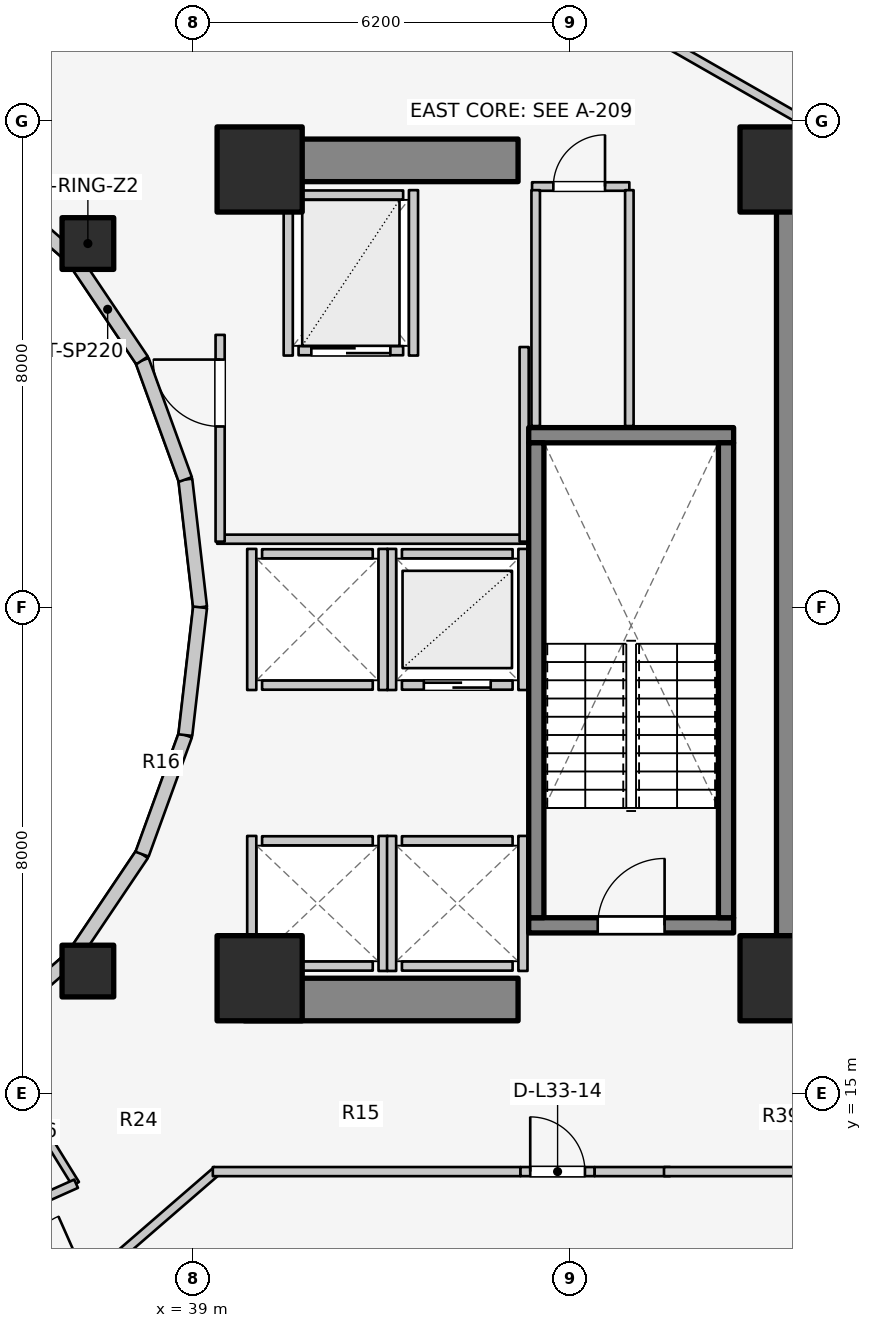
"""IFC4 building model, lengths in metres.
Left out: names, types, materials, properties, quantities, classifications, styles, units other than length and angle.
Written with IfcOpenShell. Run it as: python <this file> out.ifc"""

import sys

from ifc_helpers import new_model, si_unit, direction, frame, frame_2d, origin, origin_2d, place, context, subcontext, project, spatial, rectangle, extrude, element, fill, save


model = new_model("IFC4")
c1 = context("Model", 3, precision=1e-05, world=origin(), true_north=direction((0.0, 1.0)))
c2 = subcontext(c1, "Body", "Model", "MODEL_VIEW")
j1 = project(units=[si_unit("LENGTHUNIT", "METRE"), si_unit("PLANEANGLEUNIT", "RADIAN")], contexts=[c1])
p1 = place(None, origin())
s1 = spatial("IfcSite", under=j1, at=p1, CompositionType="ELEMENT")
p2 = place(p1, origin())
s2 = spatial("IfcBuilding", under=s1, at=p2, CompositionType="ELEMENT")
p3 = place(p2, frame((0.0, 0.0, 110.4)))
s3 = spatial("IfcBuildingStorey", under=s2, at=p3, CompositionType="ELEMENT", Elevation=110.4)
p4 = place(p3, frame((48.95, 17.05, 0.0), z_axis=(0.0, 0.0, 1.0), x_axis=(0.0, 1.0, 0.0)))
e1 = element("IfcWall", 1, at=p4, inside=s3, PredefinedType="SHEAR", context=c2, shape_type="SweptSolid", body=[
    extrude(rectangle(XDim=12.8, YDim=0.7, at=frame_2d((6.4, 0.0))), origin(), (0.0, 0.0, 1.0), 3.1),
])
for number, where, z_axis, x_axis in (
    (2, (39.85, 16.55, 0.0), (0.0, 0.0, 1.0), (1.0, 0.0, 0.0)),
    (3, (39.85, 30.35, 0.0), (0.0, 0.0, 1.0), (1.0, 0.0, 0.0)),
):
    element("IfcWall", number, at=place(p3, frame(where, z_axis=z_axis, x_axis=x_axis)), inside=s3, PredefinedType="SHEAR", context=c2, shape_type="SweptSolid", body=[
        extrude(rectangle(XDim=4.5, YDim=0.7, at=frame_2d((2.25, 0.0))), origin(), (0.0, 0.0, 1.0), 3.1),
    ])
p5 = place(p3, frame((44.525, 17.77, 0.0), z_axis=(0.0, 0.0, 1.0), x_axis=(1.0, 0.0, 0.0)))
e4 = element("IfcWall", 4, at=p5, inside=s3, PredefinedType="SOLIDWALL", context=c2, shape_type="SweptSolid", body=[
    extrude(rectangle(XDim=3.37, YDim=0.25, at=frame_2d((1.685, 0.0))), origin(), (0.0, 0.0, 1.0), 3.1),
])
p6 = place(p5, frame((1.135, 0.0, 0.0)))
e5 = element("IfcOpeningElement", 5, at=p6, cuts=e4, PredefinedType="OPENING", context=c2, shape_type="SweptSolid", body=[
    extrude(rectangle(XDim=1.1, YDim=2.1, at=frame_2d((0.55, 1.05))), frame((0.0, 0.135, 0.0), z_axis=(0.0, -1.0, 0.0), x_axis=(1.0, 0.0, 0.0)), (0.0, 0.0, 1.0), 0.27),
])
p7 = place(p3, frame((44.525, 25.83, 0.0), z_axis=(0.0, 0.0, 1.0), x_axis=(1.0, 0.0, 0.0)))
e6 = element("IfcWall", 6, at=p7, inside=s3, PredefinedType="SOLIDWALL", context=c2, shape_type="SweptSolid", body=[
    extrude(rectangle(XDim=3.37, YDim=0.25, at=frame_2d((1.685, 0.0))), origin(), (0.0, 0.0, 1.0), 3.1),
])
for number, where, z_axis, x_axis in (
    (7, (44.65, 17.895, 0.0), (0.0, 0.0, 1.0), (0.0, 1.0, 0.0)),
    (8, (47.77, 17.895, 0.0), (0.0, 0.0, 1.0), (0.0, 1.0, 0.0)),
):
    element("IfcWall", number, at=place(p3, frame(where, z_axis=z_axis, x_axis=x_axis)), inside=s3, PredefinedType="SOLIDWALL", context=c2, shape_type="SweptSolid", body=[
        extrude(rectangle(XDim=7.81, YDim=0.25, at=frame_2d((3.905, 0.0))), origin(), (0.0, 0.0, 1.0), 3.1),
    ])
for number, where, z_axis, x_axis in (
    (9, (40.1, 16.9, 0.0), (0.0, 0.0, 1.0), (1.0, 0.0, 0.0)),
    (10, (48.7, 16.9, 0.0), (0.0, 0.0, 1.0), (1.0, 0.0, 0.0)),
    (11, (48.7, 30.2, 0.0), (0.0, 0.0, 1.0), (1.0, 0.0, 0.0)),
    (12, (40.1, 30.2, 0.0), (0.0, 0.0, 1.0), (1.0, 0.0, 0.0)),
):
    element("IfcColumn", number, at=place(p3, frame(where, z_axis=z_axis, x_axis=x_axis)), inside=s3, PredefinedType="COLUMN", context=c2, shape_type="SweptSolid", body=[
        extrude(rectangle(XDim=1.4, YDim=1.4, at=origin_2d()), origin(), (0.0, 0.0, 1.0), 3.1),
    ])
for number, where, z_axis, x_axis in (
    (13, (37.275, 28.982, 0.0), (0.0, 0.0, 1.0), (1.0, 0.0, 0.0)),
    (14, (37.275, 17.018, 0.0), (0.0, 0.0, 1.0), (1.0, 0.0, 0.0)),
):
    element("IfcColumn", number, at=place(p3, frame(where, z_axis=z_axis, x_axis=x_axis)), inside=s3, PredefinedType="COLUMN", context=c2, shape_type="SweptSolid", body=[
        extrude(rectangle(XDim=0.85, YDim=0.85, at=origin_2d()), origin(), (0.0, 0.0, 1.0), 3.1),
    ])
p8 = place(p3, frame((39.12, 23.0, 0.0), z_axis=(0.0, 0.0, 1.0), x_axis=(-0.114711713601, 0.993398823617, 0.0)))
e15 = element("IfcWall", 15, at=p8, inside=s3, PredefinedType="STANDARD", context=c2, shape_type="SweptSolid", body=[
    extrude(rectangle(XDim=2.115, YDim=0.23, at=frame_2d((1.058, 0.0))), origin(), (0.0, 0.0, 1.0), 2.56),
])
p9 = place(p3, frame((38.877, 25.102, 0.0), z_axis=(0.0, 0.0, 1.0), x_axis=(-0.341423187295, 0.93990968033, 0.0)))
e16 = element("IfcWall", 16, at=p9, inside=s3, PredefinedType="STANDARD", context=c2, shape_type="SweptSolid", body=[
    extrude(rectangle(XDim=2.084, YDim=0.23, at=frame_2d((1.042, 0.0))), origin(), (0.0, 0.0, 1.0), 2.56),
])
p10 = place(p3, frame((38.166, 27.06, 0.0), z_axis=(0.0, 0.0, 1.0), x_axis=(-0.558197800898, 0.829707909492, 0.0)))
e17 = element("IfcWall", 17, at=p10, inside=s3, PredefinedType="STANDARD", context=c2, shape_type="SweptSolid", body=[
    extrude(rectangle(XDim=2.027, YDim=0.23, at=frame_2d((1.013, 0.0))), origin(), (0.0, 0.0, 1.0), 1.22),
])
for number, where, z_axis, x_axis in (
    (18, (37.035, 28.742, 0.0), (0.0, 0.0, 1.0), (-0.753, 0.659, 0.0)),
    (19, (35.56, 15.968, 0.0), (0.0, 0.0, 1.0), (0.753, 0.659, 0.0)),
):
    element("IfcWall", number, at=place(p3, frame(where, z_axis=z_axis, x_axis=x_axis)), inside=s3, PredefinedType="STANDARD", context=c2, shape_type="SweptSolid", body=[
        extrude(rectangle(XDim=1.959, YDim=0.23, at=frame_2d((0.98, 0.0))), origin(), (0.0, 0.0, 1.0), 1.22),
    ])
p11 = place(p3, frame((37.035, 17.258, 0.0), z_axis=(0.0, 0.0, 1.0), x_axis=(0.558197800898, 0.829707909492, 0.0)))
e20 = element("IfcWall", 20, at=p11, inside=s3, PredefinedType="STANDARD", context=c2, shape_type="SweptSolid", body=[
    extrude(rectangle(XDim=2.027, YDim=0.23, at=frame_2d((1.013, 0.0))), origin(), (0.0, 0.0, 1.0), 1.22),
])
p12 = place(p3, frame((38.166, 18.94, 0.0), z_axis=(0.0, 0.0, 1.0), x_axis=(0.341423187295, 0.93990968033, 0.0)))
e21 = element("IfcWall", 21, at=p12, inside=s3, PredefinedType="STANDARD", context=c2, shape_type="SweptSolid", body=[
    extrude(rectangle(XDim=2.084, YDim=0.23, at=frame_2d((1.042, 0.0))), origin(), (0.0, 0.0, 1.0), 2.56),
])
p13 = place(p3, frame((38.877, 20.898, 0.0), z_axis=(0.0, 0.0, 1.0), x_axis=(0.114711713601, 0.993398823617, 0.0)))
e22 = element("IfcWall", 22, at=p13, inside=s3, PredefinedType="STANDARD", context=c2, shape_type="SweptSolid", body=[
    extrude(rectangle(XDim=2.115, YDim=0.23, at=frame_2d((1.058, 0.0))), origin(), (0.0, 0.0, 1.0), 2.56),
])
for number, where, z_axis, x_axis in (
    (23, (40.14, 19.16, 0.0), (0.0, 0.0, 1.0), (1.0, 0.0, 0.0)),
    (24, (40.14, 17.1, 0.0), (0.0, 0.0, 1.0), (1.0, 0.0, 0.0)),
):
    element("IfcWall", number, at=place(p3, frame(where, z_axis=z_axis, x_axis=x_axis)), inside=s3, PredefinedType="SOLIDWALL", context=c2, shape_type="SweptSolid", body=[
        extrude(rectangle(XDim=1.82, YDim=0.15, at=frame_2d((0.91, 0.0))), origin(), (0.0, 0.0, 1.0), 2.12),
    ])
p14 = place(p3, frame((39.97, 17.02, 0.0), z_axis=(0.0, 0.0, 1.0), x_axis=(0.0, 1.0, 0.0)))
e25 = element("IfcWall", 25, at=p14, inside=s3, PredefinedType="SOLIDWALL", context=c2, shape_type="SweptSolid", body=[
    extrude(rectangle(XDim=2.22, YDim=0.15, at=frame_2d((1.11, 0.0))), origin(), (0.0, 0.0, 1.0), 1.873),
])
p15 = place(p3, frame((42.13, 17.02, 0.0), z_axis=(0.0, 0.0, 1.0), x_axis=(0.0, 1.0, 0.0)))
e26 = element("IfcWall", 26, at=p15, inside=s3, PredefinedType="SOLIDWALL", context=c2, shape_type="SweptSolid", body=[
    extrude(rectangle(XDim=2.22, YDim=0.15, at=frame_2d((1.11, 0.0))), origin(), (0.0, 0.0, 1.0), 2.575),
])
for number, where, z_axis, x_axis in (
    (27, (42.44, 19.16, 0.0), (0.0, 0.0, 1.0), (1.0, 0.0, 0.0)),
    (28, (42.44, 17.1, 0.0), (0.0, 0.0, 1.0), (1.0, 0.0, 0.0)),
):
    element("IfcWall", number, at=place(p3, frame(where, z_axis=z_axis, x_axis=x_axis)), inside=s3, PredefinedType="SOLIDWALL", context=c2, shape_type="SweptSolid", body=[
        extrude(rectangle(XDim=1.82, YDim=0.15, at=frame_2d((0.91, 0.0))), origin(), (0.0, 0.0, 1.0), 2.575),
    ])
p16 = place(p3, frame((42.27, 17.02, 0.0), z_axis=(0.0, 0.0, 1.0), x_axis=(0.0, 1.0, 0.0)))
e29 = element("IfcWall", 29, at=p16, inside=s3, PredefinedType="SOLIDWALL", context=c2, shape_type="SweptSolid", body=[
    extrude(rectangle(XDim=2.22, YDim=0.15, at=frame_2d((1.11, 0.0))), origin(), (0.0, 0.0, 1.0), 2.575),
])
p17 = place(p3, frame((44.43, 17.02, 0.0), z_axis=(0.0, 0.0, 1.0), x_axis=(0.0, 1.0, 0.0)))
e30 = element("IfcWall", 30, at=p17, inside=s3, PredefinedType="SOLIDWALL", context=c2, shape_type="SweptSolid", body=[
    extrude(rectangle(XDim=2.22, YDim=0.15, at=frame_2d((1.11, 0.0))), origin(), (0.0, 0.0, 1.0), 2.12),
])
p18 = place(p3, frame((42.44, 21.72, 0.0), z_axis=(0.0, 0.0, 1.0), x_axis=(1.0, 0.0, 0.0)))
e31 = element("IfcWall", 31, at=p18, inside=s3, PredefinedType="SOLIDWALL", context=c2, shape_type="SweptSolid", body=[
    extrude(rectangle(XDim=1.82, YDim=0.15, at=frame_2d((0.91, 0.0))), origin(), (0.0, 0.0, 1.0), 2.575),
])
p19 = place(p18, frame((0.36, 0.0, 0.0)))
e32 = element("IfcOpeningElement", 32, at=p19, cuts=e31, PredefinedType="OPENING", context=c2, shape_type="SweptSolid", body=[
    extrude(rectangle(XDim=1.1, YDim=2.1, at=frame_2d((0.55, 1.05))), frame((0.0, 0.085, 0.0), z_axis=(0.0, -1.0, 0.0), x_axis=(1.0, 0.0, 0.0)), (0.0, 0.0, 1.0), 0.17),
])
p20 = place(p3, frame((42.44, 23.88, 0.0), z_axis=(0.0, 0.0, 1.0), x_axis=(1.0, 0.0, 0.0)))
e33 = element("IfcWall", 33, at=p20, inside=s3, PredefinedType="SOLIDWALL", context=c2, shape_type="SweptSolid", body=[
    extrude(rectangle(XDim=1.82, YDim=0.15, at=frame_2d((0.91, 0.0))), origin(), (0.0, 0.0, 1.0), 2.575),
])
for number, where, z_axis, x_axis in (
    (34, (42.27, 21.64, 0.0), (0.0, 0.0, 1.0), (0.0, 1.0, 0.0)),
    (35, (44.43, 21.64, 0.0), (0.0, 0.0, 1.0), (0.0, 1.0, 0.0)),
):
    element("IfcWall", number, at=place(p3, frame(where, z_axis=z_axis, x_axis=x_axis)), inside=s3, PredefinedType="SOLIDWALL", context=c2, shape_type="SweptSolid", body=[
        extrude(rectangle(XDim=2.32, YDim=0.15, at=frame_2d((1.16, 0.0))), origin(), (0.0, 0.0, 1.0), 2.575),
    ])
for number, where, z_axis, x_axis in (
    (36, (40.14, 21.72, 0.0), (0.0, 0.0, 1.0), (1.0, 0.0, 0.0)),
    (37, (40.14, 23.88, 0.0), (0.0, 0.0, 1.0), (1.0, 0.0, 0.0)),
):
    element("IfcWall", number, at=place(p3, frame(where, z_axis=z_axis, x_axis=x_axis)), inside=s3, PredefinedType="SOLIDWALL", context=c2, shape_type="SweptSolid", body=[
        extrude(rectangle(XDim=1.82, YDim=0.15, at=frame_2d((0.91, 0.0))), origin(), (0.0, 0.0, 1.0), 2.12),
    ])
p21 = place(p3, frame((39.97, 21.64, 0.0), z_axis=(0.0, 0.0, 1.0), x_axis=(0.0, 1.0, 0.0)))
e38 = element("IfcWall", 38, at=p21, inside=s3, PredefinedType="SOLIDWALL", context=c2, shape_type="SweptSolid", body=[
    extrude(rectangle(XDim=2.32, YDim=0.15, at=frame_2d((1.16, 0.0))), origin(), (0.0, 0.0, 1.0), 2.12),
])
p22 = place(p3, frame((42.13, 21.64, 0.0), z_axis=(0.0, 0.0, 1.0), x_axis=(0.0, 1.0, 0.0)))
e39 = element("IfcWall", 39, at=p22, inside=s3, PredefinedType="SOLIDWALL", context=c2, shape_type="SweptSolid", body=[
    extrude(rectangle(XDim=2.32, YDim=0.15, at=frame_2d((1.16, 0.0))), origin(), (0.0, 0.0, 1.0), 2.575),
])
p23 = place(p3, frame((40.74, 27.22, 0.0), z_axis=(0.0, 0.0, 1.0), x_axis=(1.0, 0.0, 0.0)))
e40 = element("IfcWall", 40, at=p23, inside=s3, PredefinedType="SOLIDWALL", context=c2, shape_type="SweptSolid", body=[
    extrude(rectangle(XDim=1.72, YDim=0.15, at=frame_2d((0.86, 0.0))), origin(), (0.0, 0.0, 1.0), 2.575),
])
p24 = place(p23, frame((0.21, 0.0, 0.0)))
e41 = element("IfcOpeningElement", 41, at=p24, cuts=e40, PredefinedType="OPENING", context=c2, shape_type="SweptSolid", body=[
    extrude(rectangle(XDim=1.3, YDim=2.1, at=frame_2d((0.65, 1.05))), frame((0.0, 0.085, 0.0), z_axis=(0.0, -1.0, 0.0), x_axis=(1.0, 0.0, 0.0)), (0.0, 0.0, 1.0), 0.17),
])
p25 = place(p3, frame((40.74, 29.78, 0.0), z_axis=(0.0, 0.0, 1.0), x_axis=(1.0, 0.0, 0.0)))
e42 = element("IfcWall", 42, at=p25, inside=s3, PredefinedType="SOLIDWALL", context=c2, shape_type="SweptSolid", body=[
    extrude(rectangle(XDim=1.72, YDim=0.15, at=frame_2d((0.86, 0.0))), origin(), (0.0, 0.0, 1.0), 2.575),
])
for number, where, z_axis, x_axis in (
    (43, (40.57, 27.14, 0.0), (0.0, 0.0, 1.0), (0.0, 1.0, 0.0)),
    (44, (42.63, 27.14, 0.0), (0.0, 0.0, 1.0), (0.0, 1.0, 0.0)),
):
    element("IfcWall", number, at=place(p3, frame(where, z_axis=z_axis, x_axis=x_axis)), inside=s3, PredefinedType="SOLIDWALL", context=c2, shape_type="SweptSolid", body=[
        extrude(rectangle(XDim=2.72, YDim=0.15, at=frame_2d((1.36, 0.0))), origin(), (0.0, 0.0, 1.0), 2.575),
    ])
p26 = place(p3, frame((39.4, 24.12, 0.0), z_axis=(0.0, 0.0, 1.0), x_axis=(1.0, 0.0, 0.0)))
e45 = element("IfcWall", 45, at=p26, inside=s3, PredefinedType="PARTITIONING", context=c2, shape_type="SweptSolid", body=[
    extrude(rectangle(XDim=5.08, YDim=0.15, at=frame_2d((2.54, 0.0))), origin(), (0.0, 0.0, 1.0), 2.12),
])
p27 = place(p3, frame((44.45, 24.08, 0.0), z_axis=(0.0, 0.0, 1.0), x_axis=(0.0, 1.0, 0.0)))
e46 = element("IfcWall", 46, at=p27, inside=s3, PredefinedType="PARTITIONING", context=c2, shape_type="SweptSolid", body=[
    extrude(rectangle(XDim=3.2, YDim=0.15, at=frame_2d((1.6, 0.0))), origin(), (0.0, 0.0, 1.0), 2.575),
])
p28 = place(p3, frame((39.45, 24.08, 0.0), z_axis=(0.0, 0.0, 1.0), x_axis=(0.0, 1.0, 0.0)))
e47 = element("IfcWall", 47, at=p28, inside=s3, PredefinedType="PARTITIONING", context=c2, shape_type="SweptSolid", body=[
    extrude(rectangle(XDim=3.4, YDim=0.15, at=frame_2d((1.7, 0.0))), origin(), (0.0, 0.0, 1.0), 2.575),
])
p29 = place(p28, frame((1.894, 0.0, 0.0)))
e48 = element("IfcOpeningElement", 48, at=p29, cuts=e47, PredefinedType="OPENING", context=c2, shape_type="SweptSolid", body=[
    extrude(rectangle(XDim=1.1, YDim=2.1, at=frame_2d((0.55, 1.05))), frame((0.0, 0.085, 0.0), z_axis=(0.0, -1.0, 0.0), x_axis=(1.0, 0.0, 0.0)), (0.0, 0.0, 1.0), 0.17),
])
p30 = place(p3, frame((44.58, 29.92, 0.0), z_axis=(0.0, 0.0, 1.0), x_axis=(1.0, 0.0, 0.0)))
e49 = element("IfcWall", 49, at=p30, inside=s3, PredefinedType="PLUMBINGWALL", context=c2, shape_type="SweptSolid", body=[
    extrude(rectangle(XDim=1.6, YDim=0.14, at=frame_2d((0.8, 0.0))), origin(), (0.0, 0.0, 1.0), 2.575),
])
p31 = place(p30, frame((0.35, 0.0, 0.0)))
e50 = element("IfcOpeningElement", 50, at=p31, cuts=e49, PredefinedType="OPENING", context=c2, shape_type="SweptSolid", body=[
    extrude(rectangle(XDim=0.85, YDim=2.05, at=frame_2d((0.425, 1.025))), frame((0.0, 0.08, 0.0), z_axis=(0.0, -1.0, 0.0), x_axis=(1.0, 0.0, 0.0)), (0.0, 0.0, 1.0), 0.16),
])
for number, where, z_axis, x_axis in (
    (51, (44.64, 25.98, 0.0), (0.0, 0.0, 1.0), (0.0, 1.0, 0.0)),
    (52, (46.18, 25.98, 0.0), (0.0, 0.0, 1.0), (0.0, 1.0, 0.0)),
):
    element("IfcWall", number, at=place(p3, frame(where, z_axis=z_axis, x_axis=x_axis)), inside=s3, PredefinedType="PLUMBINGWALL", context=c2, shape_type="SweptSolid", body=[
        extrude(rectangle(XDim=3.88, YDim=0.14, at=frame_2d((1.94, 0.0))), origin(), (0.0, 0.0, 1.0), 2.575),
    ])
p32 = place(p3, frame((46.757, 32.305, 0.0), z_axis=(0.0, 0.0, 1.0), x_axis=(0.867991349648, -0.496579315857, 0.0)))
e53 = element("IfcWall", 53, at=p32, inside=s3, PredefinedType="PARTITIONING", context=c2, shape_type="SweptSolid", body=[
    extrude(rectangle(XDim=2.567, YDim=0.15, at=frame_2d((1.283, 0.0))), origin(), (0.0, 0.0, 1.0), 1.22),
])
p33 = place(p3, frame((37.807, 12.358, 0.0), z_axis=(0.0, 0.0, 1.0), x_axis=(0.756055312247, 0.654507727092, 0.0)))
e54 = element("IfcWall", 54, at=p33, inside=s3, PredefinedType="PARTITIONING", context=c2, shape_type="SweptSolid", body=[
    extrude(rectangle(XDim=2.111, YDim=0.15, at=frame_2d((1.055, 0.0))), origin(), (0.0, 0.0, 1.0), 1.22),
])
p34 = place(p3, frame((39.33, 13.72, 0.0), z_axis=(0.0, 0.0, 1.0), x_axis=(1.0, 0.0, 0.0)))
e55 = element("IfcWall", 55, at=p34, inside=s3, PredefinedType="PARTITIONING", context=c2, shape_type="SweptSolid", body=[
    extrude(rectangle(XDim=5.06, YDim=0.15, at=frame_2d((2.53, 0.0))), origin(), (0.0, 0.0, 1.0), 1.22),
])
p35 = place(p3, frame((44.39, 13.72, 0.0), z_axis=(0.0, 0.0, 1.0), x_axis=(1.0, 0.0, 0.0)))
e56 = element("IfcWall", 56, at=p35, inside=s3, PredefinedType="PARTITIONING", context=c2, shape_type="SweptSolid", body=[
    extrude(rectangle(XDim=1.22, YDim=0.15, at=frame_2d((0.61, 0.0))), origin(), (0.0, 0.0, 1.0), 2.575),
])
p36 = place(p35, frame((0.16, 0.0, 0.0)))
e57 = element("IfcOpeningElement", 57, at=p36, cuts=e56, PredefinedType="OPENING", context=c2, shape_type="SweptSolid", body=[
    extrude(rectangle(XDim=0.9, YDim=2.1, at=frame_2d((0.45, 1.05))), frame((0.0, 0.085, 0.0), z_axis=(0.0, -1.0, 0.0), x_axis=(1.0, 0.0, 0.0)), (0.0, 0.0, 1.0), 0.17),
])
p37 = place(p3, frame((45.61, 13.72, 0.0), z_axis=(0.0, 0.0, 1.0), x_axis=(1.0, 0.0, 0.0)))
e58 = element("IfcWall", 58, at=p37, inside=s3, PredefinedType="PARTITIONING", context=c2, shape_type="SweptSolid", body=[
    extrude(rectangle(XDim=1.24, YDim=0.15, at=frame_2d((0.62, 0.0))), origin(), (0.0, 0.0, 1.0), 2.575),
])
p38 = place(p3, frame((46.75, 13.72, 0.0), z_axis=(0.0, 0.0, 1.0), x_axis=(1.0, 0.0, 0.0)))
e59 = element("IfcWall", 59, at=p38, inside=s3, PredefinedType="PARTITIONING", context=c2, shape_type="SweptSolid", body=[
    extrude(rectangle(XDim=5.05, YDim=0.15, at=frame_2d((2.525, 0.0))), origin(), (0.0, 0.0, 1.0), 1.22),
])
p39 = place(p3, frame((35.55, 15.985, 0.0), z_axis=(0.0, 0.0, 1.0), x_axis=(0.525627246902, -0.850714991824, 0.0)))
e60 = element("IfcWall", 60, at=p39, inside=s3, PredefinedType="PARTITIONING", context=c2, shape_type="SweptSolid", body=[
    extrude(rectangle(XDim=2.901, YDim=0.125, at=frame_2d((1.451, 0.0))), origin(), (0.0, 0.0, 1.0), 1.22),
])
p40 = place(p3, frame((36.61, 13.31, 0.0), z_axis=(0.0, 0.0, 1.0), x_axis=(0.912911125305, 0.40815839731, 0.0)))
e61 = element("IfcWall", 61, at=p40, inside=s3, PredefinedType="PARTITIONING", context=c2, shape_type="SweptSolid", body=[
    extrude(rectangle(XDim=0.516, YDim=0.15, at=frame_2d((0.258, 0.0))), origin(), (0.0, 0.0, 1.0), 2.575),
])
p41 = place(p6, origin())
e62 = element("IfcDoor", 62, at=p41, inside=s3, OperationType="SINGLE_SWING_RIGHT", PredefinedType="DOOR", context=c2, shape_type="SweptSolid", body=[
    extrude(rectangle(XDim=1.1, YDim=2.1, at=frame_2d((0.55, 1.05))), frame((0.0, 0.025, 0.0), z_axis=(0.0, -1.0, 0.0), x_axis=(1.0, 0.0, 0.0)), (0.0, 0.0, 1.0), 0.05),
])
fill(e5, e62)
p42 = place(p19, origin())
e63 = element("IfcDoor", 63, at=p42, inside=s3, OperationType="DOUBLE_DOOR_SLIDING", PredefinedType="DOOR", context=c2, shape_type="SweptSolid", body=[
    extrude(rectangle(XDim=1.1, YDim=2.1, at=frame_2d((0.55, 1.05))), frame((0.0, 0.025, 0.0), z_axis=(0.0, -1.0, 0.0), x_axis=(1.0, 0.0, 0.0)), (0.0, 0.0, 1.0), 0.05),
])
fill(e32, e63)
p43 = place(p24, origin())
e64 = element("IfcDoor", 64, at=p43, inside=s3, OperationType="DOUBLE_DOOR_SLIDING", PredefinedType="DOOR", context=c2, shape_type="SweptSolid", body=[
    extrude(rectangle(XDim=1.3, YDim=2.1, at=frame_2d((0.65, 1.05))), frame((0.0, 0.025, 0.0), z_axis=(0.0, -1.0, 0.0), x_axis=(1.0, 0.0, 0.0)), (0.0, 0.0, 1.0), 0.05),
])
fill(e41, e64)
p44 = place(p29, origin())
e65 = element("IfcDoor", 65, at=p44, inside=s3, OperationType="SINGLE_SWING_RIGHT", PredefinedType="DOOR", context=c2, shape_type="SweptSolid", body=[
    extrude(rectangle(XDim=1.1, YDim=2.1, at=frame_2d((0.55, 1.05))), frame((0.0, 0.025, 0.0), z_axis=(0.0, -1.0, 0.0), x_axis=(1.0, 0.0, 0.0)), (0.0, 0.0, 1.0), 0.05),
])
fill(e48, e65)
p45 = place(p31, origin())
e66 = element("IfcDoor", 66, at=p45, inside=s3, OperationType="SINGLE_SWING_RIGHT", PredefinedType="DOOR", context=c2, shape_type="SweptSolid", body=[
    extrude(rectangle(XDim=0.85, YDim=2.05, at=frame_2d((0.425, 1.025))), frame((0.0, 0.025, 0.0), z_axis=(0.0, -1.0, 0.0), x_axis=(1.0, 0.0, 0.0)), (0.0, 0.0, 1.0), 0.05),
])
fill(e50, e66)
p46 = place(p36, origin())
e67 = element("IfcDoor", 67, at=p46, inside=s3, OperationType="SINGLE_SWING_LEFT", PredefinedType="DOOR", context=c2, shape_type="SweptSolid", body=[
    extrude(rectangle(XDim=0.9, YDim=2.1, at=frame_2d((0.45, 1.05))), frame((0.0, 0.025, 0.0), z_axis=(0.0, -1.0, 0.0), x_axis=(1.0, 0.0, 0.0)), (0.0, 0.0, 1.0), 0.05),
])
fill(e57, e67)
save(model, sys.argv[1])
